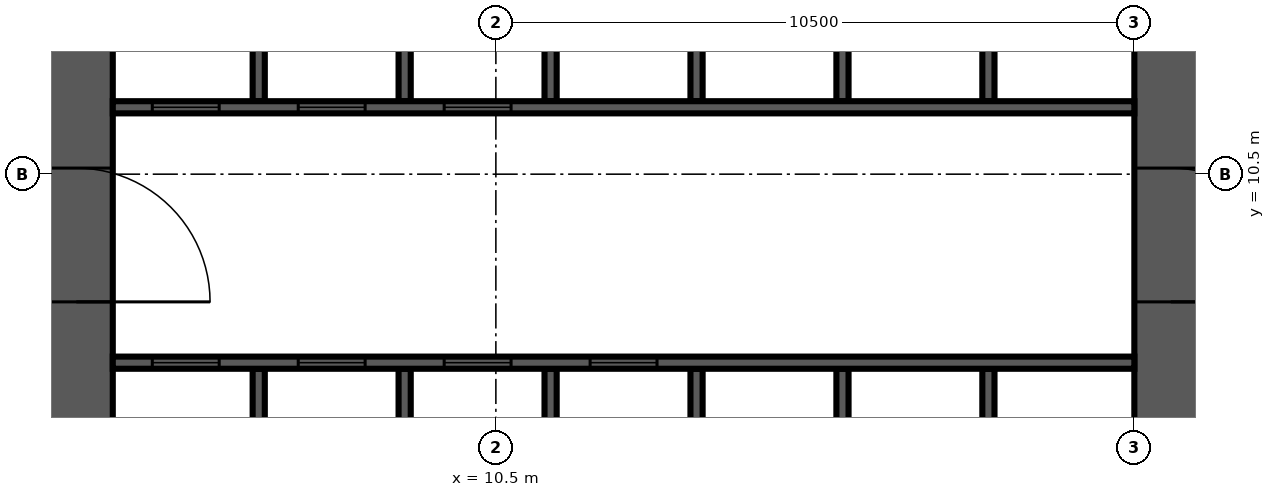
"""IFC4 building model, lengths in metres.
Left out: names, types, materials, properties, quantities, classifications, styles, units other than length and angle.
Written with IfcOpenShell. Run it as: python <this file> out.ifc"""

import sys

from ifc_helpers import new_model, si_unit, direction, frame, frame_2d, origin, place, context, subcontext, project, spatial, rectangle, extrude, source, transform, mapped, element, fill, save


model = new_model("IFC4")
c1 = context("Model", 3, precision=1e-05, world=origin(), true_north=direction((0.0, 1.0)))
c2 = subcontext(c1, "Body", "Model", "MODEL_VIEW")
j1 = project(units=[si_unit("LENGTHUNIT", "METRE"), si_unit("PLANEANGLEUNIT", "RADIAN")], contexts=[c1])
p1 = place(None, origin())
s1 = spatial("IfcSite", under=j1, at=p1, CompositionType="ELEMENT")
p2 = place(p1, origin())
s2 = spatial("IfcBuilding", under=s1, at=p2, CompositionType="ELEMENT")
p3 = place(p2, frame((0.0, 0.0, 82.5)))
s3 = spatial("IfcBuildingStorey", under=s2, at=p3, CompositionType="ELEMENT", Elevation=82.5)
m1 = source(origin(), c2, "Body", "SweptSolid", [
    extrude(rectangle(XDim=18.0, YDim=1.2, at=frame_2d((9.0, 0.0))), origin(), (0.0, 0.0, 1.0), 4.2),
])
p4 = place(p3, frame((3.6, 4.2, 0.0), z_axis=(0.0, 0.0, 1.0), x_axis=(0.0, 1.0, 0.0)))
e1 = element("IfcWall", 1, at=p4, inside=s3, PredefinedType="SHEAR", context=c2, shape_type="MappedRepresentation", body=[
    mapped(m1, transform((0.0, 0.0, 0.0), scale=1.0)),
])
m2 = source(origin(), c2, "Body", "SweptSolid", [
    extrude(rectangle(XDim=2.2, YDim=2.1, at=frame_2d((1.1, 1.05))), frame((0.0, 0.61, 0.0), z_axis=(0.0, -1.0, 0.0), x_axis=(1.0, 0.0, 0.0)), (0.0, 0.0, 1.0), 1.22),
])
p5 = place(p4, frame((4.2, 0.0, 0.0)))
e2 = element("IfcOpeningElement", 2, at=p5, cuts=e1, PredefinedType="OPENING", context=c2, shape_type="MappedRepresentation", body=[
    mapped(m2, transform((0.0, 0.0, 0.0), scale=1.0)),
])
m3 = source(origin(), c2, "Body", "SweptSolid", [
    extrude(rectangle(XDim=16.8, YDim=1.2, at=frame_2d((8.4, 0.0))), origin(), (0.0, 0.0, 1.0), 4.2),
])
p6 = place(p3, frame((21.6, 4.2, 0.0), z_axis=(0.0, 0.0, 1.0), x_axis=(0.0, 1.0, 0.0)))
e3 = element("IfcWall", 3, at=p6, inside=s3, PredefinedType="SHEAR", context=c2, shape_type="MappedRepresentation", body=[
    mapped(m3, transform((0.0, 0.0, 0.0), scale=1.0)),
])
p7 = place(p6, frame((4.2, 0.0, 0.0)))
e4 = element("IfcOpeningElement", 4, at=p7, cuts=e3, PredefinedType="OPENING", context=c2, shape_type="MappedRepresentation", body=[
    mapped(m2, transform((0.0, 0.0, 0.0), scale=1.0)),
])
m4 = source(origin(), c2, "Body", "SweptSolid", [
    extrude(rectangle(XDim=1.2, YDim=2.1, at=frame_2d((0.6, 1.05))), frame((0.0, 0.61, 0.0), z_axis=(0.0, -1.0, 0.0), x_axis=(1.0, 0.0, 0.0)), (0.0, 0.0, 1.0), 1.22),
])
p8 = place(p6, frame((14.7, 0.0, 0.0)))
e5 = element("IfcOpeningElement", 5, at=p8, cuts=e3, PredefinedType="OPENING", context=c2, shape_type="MappedRepresentation", body=[
    mapped(m4, transform((0.0, 0.0, 0.0), scale=1.0)),
])
m5 = source(origin(), c2, "Body", "SweptSolid", [
    extrude(rectangle(XDim=3.1, YDim=0.2, at=frame_2d((1.55, 0.0))), origin(), (0.0, 0.0, 1.0), 4.2),
])
for number, where, z_axis, x_axis in (
    (6, (6.6, 4.2, 0.0), (0.0, 0.0, 1.0), (0.0, 1.0, 0.0)),
    (7, (9.0, 4.2, 0.0), (0.0, 0.0, 1.0), (0.0, 1.0, 0.0)),
    (8, (11.4, 4.2, 0.0), (0.0, 0.0, 1.0), (0.0, 1.0, 0.0)),
    (9, (13.8, 4.2, 0.0), (0.0, 0.0, 1.0), (0.0, 1.0, 0.0)),
    (10, (16.2, 4.2, 0.0), (0.0, 0.0, 1.0), (0.0, 1.0, 0.0)),
    (11, (18.6, 4.2, 0.0), (0.0, 0.0, 1.0), (0.0, 1.0, 0.0)),
):
    element("IfcWall", number, at=place(p3, frame(where, z_axis=z_axis, x_axis=x_axis)), inside=s3, PredefinedType="SOLIDWALL", context=c2, shape_type="MappedRepresentation", body=[
        mapped(m5, transform((0.0, 0.0, 0.0), scale=1.0)),
    ])
m6 = source(origin(), c2, "Body", "SweptSolid", [
    extrude(rectangle(XDim=3.0, YDim=0.2, at=frame_2d((1.5, 0.0))), origin(), (0.0, 0.0, 1.0), 4.2),
])
for number, where, z_axis, x_axis in (
    (12, (6.6, 11.7, 0.0), (0.0, 0.0, 1.0), (0.0, 1.0, 0.0)),
    (13, (9.0, 11.7, 0.0), (0.0, 0.0, 1.0), (0.0, 1.0, 0.0)),
    (14, (11.4, 11.7, 0.0), (0.0, 0.0, 1.0), (0.0, 1.0, 0.0)),
    (15, (13.8, 11.7, 0.0), (0.0, 0.0, 1.0), (0.0, 1.0, 0.0)),
    (16, (16.2, 11.7, 0.0), (0.0, 0.0, 1.0), (0.0, 1.0, 0.0)),
    (17, (18.6, 11.7, 0.0), (0.0, 0.0, 1.0), (0.0, 1.0, 0.0)),
):
    element("IfcWall", number, at=place(p3, frame(where, z_axis=z_axis, x_axis=x_axis)), inside=s3, PredefinedType="SOLIDWALL", context=c2, shape_type="MappedRepresentation", body=[
        mapped(m6, transform((0.0, 0.0, 0.0), scale=1.0)),
    ])
m7 = source(origin(), c2, "Body", "SweptSolid", [
    extrude(rectangle(XDim=16.8, YDim=0.2, at=frame_2d((8.4, 0.0))), origin(), (0.0, 0.0, 1.0), 4.2),
])
p9 = place(p3, frame((4.2, 7.4, 0.0), z_axis=(0.0, 0.0, 1.0), x_axis=(1.0, 0.0, 0.0)))
e18 = element("IfcWall", 18, at=p9, inside=s3, PredefinedType="SOLIDWALL", context=c2, shape_type="MappedRepresentation", body=[
    mapped(m7, transform((0.0, 0.0, 0.0), scale=1.0)),
])
m8 = source(origin(), c2, "Body", "SweptSolid", [
    extrude(rectangle(XDim=1.1, YDim=2.1, at=frame_2d((0.55, 1.05))), frame((0.0, 0.11, 0.0), z_axis=(0.0, -1.0, 0.0), x_axis=(1.0, 0.0, 0.0)), (0.0, 0.0, 1.0), 0.22),
])
p10 = place(p9, frame((0.65, 0.0, 0.0)))
e19 = element("IfcOpeningElement", 19, at=p10, cuts=e18, PredefinedType="OPENING", context=c2, shape_type="MappedRepresentation", body=[
    mapped(m8, transform((0.0, 0.0, 0.0), scale=1.0)),
])
p11 = place(p9, frame((3.05, 0.0, 0.0)))
e20 = element("IfcOpeningElement", 20, at=p11, cuts=e18, PredefinedType="OPENING", context=c2, shape_type="MappedRepresentation", body=[
    mapped(m8, transform((0.0, 0.0, 0.0), scale=1.0)),
])
p12 = place(p9, frame((5.45, 0.0, 0.0)))
e21 = element("IfcOpeningElement", 21, at=p12, cuts=e18, PredefinedType="OPENING", context=c2, shape_type="MappedRepresentation", body=[
    mapped(m8, transform((0.0, 0.0, 0.0), scale=1.0)),
])
p13 = place(p9, frame((7.85, 0.0, 0.0)))
e22 = element("IfcOpeningElement", 22, at=p13, cuts=e18, PredefinedType="OPENING", context=c2, shape_type="MappedRepresentation", body=[
    mapped(m8, transform((0.0, 0.0, 0.0), scale=1.0)),
])
p14 = place(p3, frame((4.2, 11.6, 0.0), z_axis=(0.0, 0.0, 1.0), x_axis=(1.0, 0.0, 0.0)))
e23 = element("IfcWall", 23, at=p14, inside=s3, PredefinedType="SOLIDWALL", context=c2, shape_type="MappedRepresentation", body=[
    mapped(m7, transform((0.0, 0.0, 0.0), scale=1.0)),
])
p15 = place(p14, frame((0.65, 0.0, 0.0)))
e24 = element("IfcOpeningElement", 24, at=p15, cuts=e23, PredefinedType="OPENING", context=c2, shape_type="MappedRepresentation", body=[
    mapped(m8, transform((0.0, 0.0, 0.0), scale=1.0)),
])
p16 = place(p14, frame((3.05, 0.0, 0.0)))
e25 = element("IfcOpeningElement", 25, at=p16, cuts=e23, PredefinedType="OPENING", context=c2, shape_type="MappedRepresentation", body=[
    mapped(m8, transform((0.0, 0.0, 0.0), scale=1.0)),
])
p17 = place(p14, frame((5.45, 0.0, 0.0)))
e26 = element("IfcOpeningElement", 26, at=p17, cuts=e23, PredefinedType="OPENING", context=c2, shape_type="MappedRepresentation", body=[
    mapped(m8, transform((0.0, 0.0, 0.0), scale=1.0)),
])
m9 = source(origin(), c2, "Body", "SweptSolid", [
    extrude(rectangle(XDim=1.1, YDim=2.1, at=frame_2d((0.55, 1.05))), frame((0.0, 0.025, 0.0), z_axis=(0.0, -1.0, 0.0), x_axis=(1.0, 0.0, 0.0)), (0.0, 0.0, 1.0), 0.05),
])
p18 = place(p10, origin())
e27 = element("IfcDoor", 27, at=p18, inside=s3, OperationType="SLIDING_TO_LEFT", PredefinedType="DOOR", context=c2, shape_type="MappedRepresentation", body=[
    mapped(m9, transform((0.0, 0.0, 0.0), scale=1.0)),
])
fill(e19, e27)
p19 = place(p11, origin())
e28 = element("IfcDoor", 28, at=p19, inside=s3, OperationType="SLIDING_TO_LEFT", PredefinedType="DOOR", context=c2, shape_type="MappedRepresentation", body=[
    mapped(m9, transform((0.0, 0.0, 0.0), scale=1.0)),
])
fill(e20, e28)
p20 = place(p12, origin())
e29 = element("IfcDoor", 29, at=p20, inside=s3, OperationType="SLIDING_TO_LEFT", PredefinedType="DOOR", context=c2, shape_type="MappedRepresentation", body=[
    mapped(m9, transform((0.0, 0.0, 0.0), scale=1.0)),
])
fill(e21, e29)
p21 = place(p13, origin())
e30 = element("IfcDoor", 30, at=p21, inside=s3, OperationType="SLIDING_TO_LEFT", PredefinedType="DOOR", context=c2, shape_type="MappedRepresentation", body=[
    mapped(m9, transform((0.0, 0.0, 0.0), scale=1.0)),
])
fill(e22, e30)
p22 = place(p15, origin())
e31 = element("IfcDoor", 31, at=p22, inside=s3, OperationType="SLIDING_TO_LEFT", PredefinedType="DOOR", context=c2, shape_type="MappedRepresentation", body=[
    mapped(m9, transform((0.0, 0.0, 0.0), scale=1.0)),
])
fill(e24, e31)
p23 = place(p16, origin())
e32 = element("IfcDoor", 32, at=p23, inside=s3, OperationType="SLIDING_TO_LEFT", PredefinedType="DOOR", context=c2, shape_type="MappedRepresentation", body=[
    mapped(m9, transform((0.0, 0.0, 0.0), scale=1.0)),
])
fill(e25, e32)
p24 = place(p17, origin())
e33 = element("IfcDoor", 33, at=p24, inside=s3, OperationType="SLIDING_TO_LEFT", PredefinedType="DOOR", context=c2, shape_type="MappedRepresentation", body=[
    mapped(m9, transform((0.0, 0.0, 0.0), scale=1.0)),
])
fill(e26, e33)
m10 = source(origin(), c2, "Body", "SweptSolid", [
    extrude(rectangle(XDim=2.2, YDim=2.1, at=frame_2d((1.1, 1.05))), frame((0.0, 0.025, 0.0), z_axis=(0.0, -1.0, 0.0), x_axis=(1.0, 0.0, 0.0)), (0.0, 0.0, 1.0), 0.05),
])
p25 = place(p7, origin())
e34 = element("IfcDoor", 34, at=p25, inside=s3, OperationType="DOUBLE_DOOR_SINGLE_SWING", PredefinedType="DOOR", context=c2, shape_type="MappedRepresentation", body=[
    mapped(m10, transform((0.0, 0.0, 0.0), scale=1.0)),
])
fill(e4, e34)
p26 = place(p5, origin())
e35 = element("IfcDoor", 35, at=p26, inside=s3, OperationType="DOUBLE_DOOR_SINGLE_SWING", PredefinedType="DOOR", context=c2, shape_type="MappedRepresentation", body=[
    mapped(m10, transform((0.0, 0.0, 0.0), scale=1.0)),
])
fill(e2, e35)
save(model, sys.argv[1])
